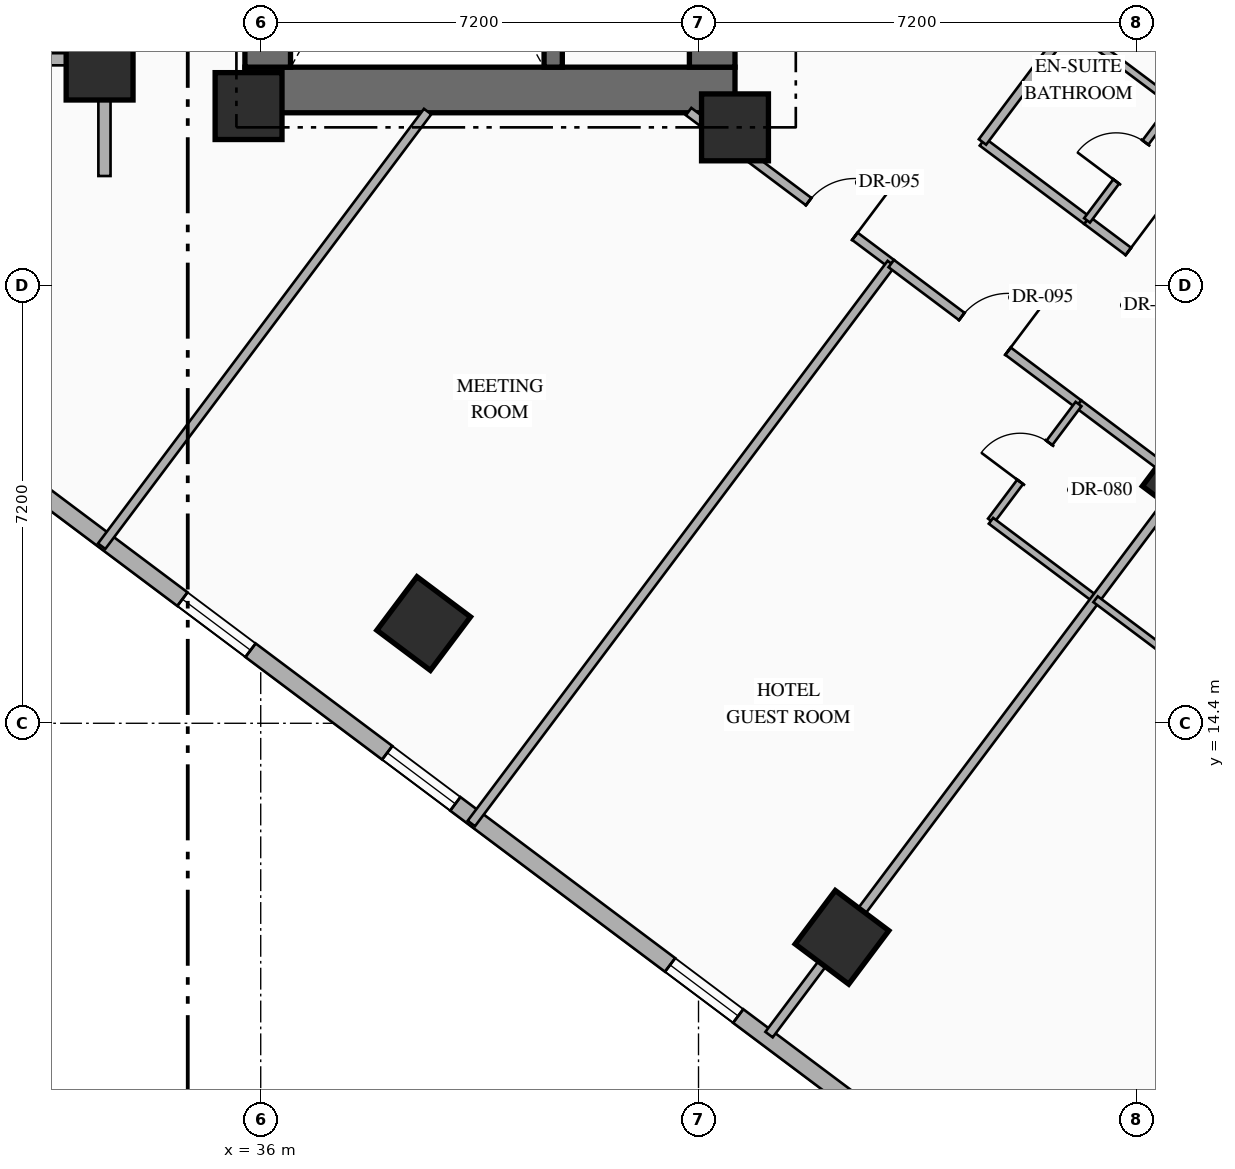
"""IFC4 building model, lengths in metres.
Left out: names, types, materials, properties, quantities, classifications, styles, units other than length and angle.
Written with IfcOpenShell. Run it as: python <this file> out.ifc"""

import sys

from ifc_helpers import new_model, si_unit, direction, frame, frame_2d, origin, origin_2d, place, context, subcontext, project, spatial, rectangle, hollow_rectangle, extrude, element, fill, save


model = new_model("IFC4")
c1 = context("Model", 3, precision=1e-05, world=origin(), true_north=direction((0.0, 1.0)))
c2 = subcontext(c1, "Body", "Model", "MODEL_VIEW")
j1 = project(units=[si_unit("LENGTHUNIT", "METRE"), si_unit("PLANEANGLEUNIT", "RADIAN")], contexts=[c1])
p1 = place(None, origin())
s1 = spatial("IfcSite", under=j1, at=p1, CompositionType="ELEMENT")
p2 = place(p1, origin())
s2 = spatial("IfcBuilding", under=s1, at=p2, CompositionType="ELEMENT")
p3 = place(p2, frame((0.0, 0.0, 56.7)))
s3 = spatial("IfcBuildingStorey", under=s2, at=p3, CompositionType="ELEMENT", Elevation=56.7)
p4 = place(p3, frame((35.74, 24.815, 0.0), z_axis=(0.0, 0.0, 1.0), x_axis=(1.0, 0.0, 0.0)))
e1 = element("IfcWall", 1, at=p4, inside=s3, PredefinedType="SHEAR", context=c2, shape_type="SweptSolid", body=[
    extrude(rectangle(XDim=8.06, YDim=0.75, at=frame_2d((4.03, 0.0))), origin(), (0.0, 0.0, 1.0), 3.35),
])
p5 = place(p3, frame((36.115, 25.19, 0.0), z_axis=(0.0, 0.0, 1.0), x_axis=(0.0, 1.0, 0.0)))
e2 = element("IfcWall", 2, at=p5, inside=s3, PredefinedType="SHEAR", context=c2, shape_type="SweptSolid", body=[
    extrude(rectangle(XDim=9.48, YDim=0.75, at=frame_2d((4.74, 0.0))), origin(), (0.0, 0.0, 1.0), 3.35),
])
p6 = place(p3, frame((43.425, 25.19, 0.0), z_axis=(0.0, 0.0, 1.0), x_axis=(0.0, 1.0, 0.0)))
e3 = element("IfcWall", 3, at=p6, inside=s3, PredefinedType="SHEAR", context=c2, shape_type="SweptSolid", body=[
    extrude(rectangle(XDim=9.48, YDim=0.75, at=frame_2d((4.74, 0.0))), origin(), (0.0, 0.0, 1.0), 3.35),
])
p7 = place(p6, frame((1.21, 0.0, 0.0)))
e4 = element("IfcOpeningElement", 4, at=p7, cuts=e3, PredefinedType="OPENING", context=c2, shape_type="SweptSolid", body=[
    extrude(rectangle(XDim=0.85, YDim=2.08, at=frame_2d((0.425, 1.04))), frame((0.0, 0.385, 0.0), z_axis=(0.0, -1.0, 0.0), x_axis=(1.0, 0.0, 0.0)), (0.0, 0.0, 1.0), 0.77),
])
p8 = place(p6, frame((4.46, 0.0, 0.0)))
e5 = element("IfcOpeningElement", 5, at=p8, cuts=e3, PredefinedType="OPENING", context=c2, shape_type="SweptSolid", body=[
    extrude(rectangle(XDim=0.85, YDim=2.08, at=frame_2d((0.425, 1.04))), frame((0.0, 0.385, 0.0), z_axis=(0.0, -1.0, 0.0), x_axis=(1.0, 0.0, 0.0)), (0.0, 0.0, 1.0), 0.77),
])
p9 = place(p3, frame((40.81, 25.19, 0.0), z_axis=(0.0, 0.0, 1.0), x_axis=(0.0, 1.0, 0.0)))
e6 = element("IfcWall", 6, at=p9, inside=s3, PredefinedType="SHEAR", context=c2, shape_type="SweptSolid", body=[
    extrude(rectangle(XDim=9.48, YDim=0.3, at=frame_2d((4.74, 0.0))), origin(), (0.0, 0.0, 1.0), 3.35),
])
for number, where, z_axis, x_axis in (
    (7, (35.8, 24.55, 0.0), (0.0, 0.0, 1.0), (1.0, 0.0, 0.0)),
    (8, (43.8, 24.2, 0.0), (0.0, 0.0, 1.0), (1.0, 0.0, 0.0)),
):
    element("IfcColumn", number, at=place(p3, frame(where, z_axis=z_axis, x_axis=x_axis)), inside=s3, PredefinedType="COLUMN", context=c2, shape_type="SweptSolid", body=[
        extrude(rectangle(XDim=1.1, YDim=1.1, at=origin_2d()), origin(), (0.0, 0.0, 1.0), 3.35),
    ])
for number, where, z_axis, x_axis in (
    (9, (33.35, 25.2, 0.0), (0.0, 0.0, 1.0), (1.0, 0.0, 0.0)),
    (10, (38.68, 16.04, 0.0), (0.0, 0.0, 1.0), (0.8, -0.6, 0.0)),
    (11, (45.56, 10.88, 0.0), (0.0, 0.0, 1.0), (0.8, -0.6, 0.0)),
):
    element("IfcColumn", number, at=place(p3, frame(where, z_axis=z_axis, x_axis=x_axis)), inside=s3, PredefinedType="COLUMN", context=c2, shape_type="SweptSolid", body=[
        extrude(hollow_rectangle(XDim=1.1, YDim=1.1, WallThickness=0.04, at=origin_2d()), origin(), (0.0, 0.0, 1.0), 3.35),
    ])
p10 = place(p3, frame((51.2, 18.4, 0.0), z_axis=(0.0, 0.0, 1.0), x_axis=(0.799999996291, -0.600000004945, 0.0)))
e12 = element("IfcColumn", 12, at=p10, inside=s3, PredefinedType="COLUMN", context=c2, shape_type="SweptSolid", body=[
    extrude(hollow_rectangle(XDim=1.0, YDim=1.0, WallThickness=0.038, at=origin_2d()), origin(), (0.0, 0.0, 1.0), 3.35),
])
p11 = place(p3, frame((44.86, 40.73, 0.0), z_axis=(0.0, 0.0, 1.0), x_axis=(0.800006902154, -0.599990797017, 0.0)))
e13 = element("IfcWall", 13, at=p11, inside=s3, PredefinedType="STANDARD", context=c2, shape_type="SweptSolid", body=[
    extrude(rectangle(XDim=29.712, YDim=0.28, at=frame_2d((14.856, 0.0))), origin(), (0.0, 0.0, 1.0), 3.13),
])
p12 = place(p11, frame((14.249, 0.0, 0.0)))
e14 = element("IfcOpeningElement", 14, at=p12, cuts=e13, PredefinedType="OPENING", context=c2, shape_type="SweptSolid", body=[
    extrude(rectangle(XDim=1.1, YDim=2.2, at=frame_2d((0.55, 1.1))), frame((0.0, 0.15, 0.0), z_axis=(0.0, -1.0, 0.0), x_axis=(1.0, 0.0, 0.0)), (0.0, 0.0, 1.0), 0.3),
])
p13 = place(p11, frame((1.612, 0.0, 0.85)))
e15 = element("IfcOpeningElement", 15, at=p13, cuts=e13, PredefinedType="OPENING", context=c2, shape_type="SweptSolid", body=[
    extrude(rectangle(XDim=1.4, YDim=1.8, at=frame_2d((0.7, 0.9))), frame((0.0, 0.15, 0.0), z_axis=(0.0, -1.0, 0.0), x_axis=(1.0, 0.0, 0.0)), (0.0, 0.0, 1.0), 0.3),
])
p14 = place(p11, frame((5.667, 0.0, 0.85)))
e16 = element("IfcOpeningElement", 16, at=p14, cuts=e13, PredefinedType="OPENING", context=c2, shape_type="SweptSolid", body=[
    extrude(rectangle(XDim=1.4, YDim=1.8, at=frame_2d((0.7, 0.9))), frame((0.0, 0.15, 0.0), z_axis=(0.0, -1.0, 0.0), x_axis=(1.0, 0.0, 0.0)), (0.0, 0.0, 1.0), 0.3),
])
p15 = place(p11, frame((9.912, 0.0, 0.85)))
e17 = element("IfcOpeningElement", 17, at=p15, cuts=e13, PredefinedType="OPENING", context=c2, shape_type="SweptSolid", body=[
    extrude(rectangle(XDim=1.4, YDim=1.8, at=frame_2d((0.7, 0.9))), frame((0.0, 0.15, 0.0), z_axis=(0.0, -1.0, 0.0), x_axis=(1.0, 0.0, 0.0)), (0.0, 0.0, 1.0), 0.3),
])
p16 = place(p11, frame((19.528, 0.0, 0.85)))
e18 = element("IfcOpeningElement", 18, at=p16, cuts=e13, PredefinedType="OPENING", context=c2, shape_type="SweptSolid", body=[
    extrude(rectangle(XDim=1.4, YDim=1.8, at=frame_2d((0.7, 0.9))), frame((0.0, 0.15, 0.0), z_axis=(0.0, -1.0, 0.0), x_axis=(1.0, 0.0, 0.0)), (0.0, 0.0, 1.0), 0.3),
])
p17 = place(p11, frame((23.451, 0.0, 0.85)))
e19 = element("IfcOpeningElement", 19, at=p17, cuts=e13, PredefinedType="OPENING", context=c2, shape_type="SweptSolid", body=[
    extrude(rectangle(XDim=1.4, YDim=1.8, at=frame_2d((0.7, 0.9))), frame((0.0, 0.15, 0.0), z_axis=(0.0, -1.0, 0.0), x_axis=(1.0, 0.0, 0.0)), (0.0, 0.0, 1.0), 0.3),
])
p18 = place(p11, frame((27.852, 0.0, 0.85)))
e20 = element("IfcOpeningElement", 20, at=p18, cuts=e13, PredefinedType="OPENING", context=c2, shape_type="SweptSolid", body=[
    extrude(rectangle(XDim=1.4, YDim=1.8, at=frame_2d((0.7, 0.9))), frame((0.0, 0.15, 0.0), z_axis=(0.0, -1.0, 0.0), x_axis=(1.0, 0.0, 0.0)), (0.0, 0.0, 1.0), 0.3),
])
p19 = place(p3, frame((53.318, 2.487, 0.0), z_axis=(0.0, 0.0, 1.0), x_axis=(-0.800004174678, 0.599994433723, 0.0)))
e21 = element("IfcWall", 21, at=p19, inside=s3, PredefinedType="STANDARD", context=c2, shape_type="SweptSolid", body=[
    extrude(rectangle(XDim=35.089, YDim=0.28, at=frame_2d((17.544, 0.0))), origin(), (0.0, 0.0, 1.0), 3.13),
])
p20 = place(p19, frame((1.931, 0.0, 0.85)))
e22 = element("IfcOpeningElement", 22, at=p20, cuts=e21, PredefinedType="OPENING", context=c2, shape_type="SweptSolid", body=[
    extrude(rectangle(XDim=1.4, YDim=1.8, at=frame_2d((0.7, 0.9))), frame((0.0, 0.15, 0.0), z_axis=(0.0, -1.0, 0.0), x_axis=(1.0, 0.0, 0.0)), (0.0, 0.0, 1.0), 0.3),
])
p21 = place(p19, frame((6.819, 0.0, 0.85)))
e23 = element("IfcOpeningElement", 23, at=p21, cuts=e21, PredefinedType="OPENING", context=c2, shape_type="SweptSolid", body=[
    extrude(rectangle(XDim=1.4, YDim=1.8, at=frame_2d((0.7, 0.9))), frame((0.0, 0.15, 0.0), z_axis=(0.0, -1.0, 0.0), x_axis=(1.0, 0.0, 0.0)), (0.0, 0.0, 1.0), 0.3),
])
p22 = place(p19, frame((11.832, 0.0, 0.85)))
e24 = element("IfcOpeningElement", 24, at=p22, cuts=e21, PredefinedType="OPENING", context=c2, shape_type="SweptSolid", body=[
    extrude(rectangle(XDim=1.4, YDim=1.8, at=frame_2d((0.7, 0.9))), frame((0.0, 0.15, 0.0), z_axis=(0.0, -1.0, 0.0), x_axis=(1.0, 0.0, 0.0)), (0.0, 0.0, 1.0), 0.3),
])
p23 = place(p19, frame((17.647, 0.0, 0.85)))
e25 = element("IfcOpeningElement", 25, at=p23, cuts=e21, PredefinedType="OPENING", context=c2, shape_type="SweptSolid", body=[
    extrude(rectangle(XDim=1.4, YDim=1.8, at=frame_2d((0.7, 0.9))), frame((0.0, 0.15, 0.0), z_axis=(0.0, -1.0, 0.0), x_axis=(1.0, 0.0, 0.0)), (0.0, 0.0, 1.0), 0.3),
])
p24 = place(p19, frame((21.857, 0.0, 0.85)))
e26 = element("IfcOpeningElement", 26, at=p24, cuts=e21, PredefinedType="OPENING", context=c2, shape_type="SweptSolid", body=[
    extrude(rectangle(XDim=1.4, YDim=1.8, at=frame_2d((0.7, 0.9))), frame((0.0, 0.15, 0.0), z_axis=(0.0, -1.0, 0.0), x_axis=(1.0, 0.0, 0.0)), (0.0, 0.0, 1.0), 0.3),
])
p25 = place(p19, frame((26.87, 0.0, 0.85)))
e27 = element("IfcOpeningElement", 27, at=p25, cuts=e21, PredefinedType="OPENING", context=c2, shape_type="SweptSolid", body=[
    extrude(rectangle(XDim=1.4, YDim=1.8, at=frame_2d((0.7, 0.9))), frame((0.0, 0.15, 0.0), z_axis=(0.0, -1.0, 0.0), x_axis=(1.0, 0.0, 0.0)), (0.0, 0.0, 1.0), 0.3),
])
p26 = place(p19, frame((31.757, 0.0, 0.85)))
e28 = element("IfcOpeningElement", 28, at=p26, cuts=e21, PredefinedType="OPENING", context=c2, shape_type="SweptSolid", body=[
    extrude(rectangle(XDim=1.4, YDim=1.8, at=frame_2d((0.7, 0.9))), frame((0.0, 0.15, 0.0), z_axis=(0.0, -1.0, 0.0), x_axis=(1.0, 0.0, 0.0)), (0.0, 0.0, 1.0), 0.3),
])
p27 = place(p3, frame((33.43, 23.4, 0.0), z_axis=(0.0, 0.0, 1.0), x_axis=(0.0, 1.0, 0.0)))
e29 = element("IfcWall", 29, at=p27, inside=s3, PredefinedType="STANDARD", context=c2, shape_type="SweptSolid", body=[
    extrude(rectangle(XDim=4.08, YDim=0.2, at=frame_2d((2.04, 0.0))), origin(), (0.0, 0.0, 1.0), 2.425),
])
p28 = place(p3, frame((25.55, 25.32, 0.0), z_axis=(0.0, 0.0, 1.0), x_axis=(1.0, 0.0, 0.0)))
e30 = element("IfcWall", 30, at=p28, inside=s3, PredefinedType="STANDARD", context=c2, shape_type="SweptSolid", body=[
    extrude(rectangle(XDim=7.88, YDim=0.2, at=frame_2d((3.94, 0.0))), origin(), (0.0, 0.0, 1.0), 2.525),
])
p29 = place(p3, frame((43.037, 24.46, 0.0), z_axis=(0.0, 0.0, 1.0), x_axis=(0.799971872363, -0.600037501685, 0.0)))
e31 = element("IfcWall", 31, at=p29, inside=s3, PredefinedType="PARTITIONING", context=c2, shape_type="SweptSolid", body=[
    extrude(rectangle(XDim=4.167, YDim=0.15, at=frame_2d((2.083, 0.0))), origin(), (0.0, 0.0, 1.0), 2.425),
])
p30 = place(p29, frame((2.468, 0.0, 0.0)))
e32 = element("IfcOpeningElement", 32, at=p30, cuts=e31, PredefinedType="OPENING", context=c2, shape_type="SweptSolid", body=[
    extrude(rectangle(XDim=0.95, YDim=2.15, at=frame_2d((0.475, 1.075))), frame((0.0, 0.085, 0.0), z_axis=(0.0, -1.0, 0.0), x_axis=(1.0, 0.0, 0.0)), (0.0, 0.0, 1.0), 0.17),
])
p31 = place(p3, frame((33.384, 17.312, 0.0), z_axis=(0.0, 0.0, 1.0), x_axis=(0.600008743659, 0.799993442181, 0.0)))
e33 = element("IfcWall", 33, at=p31, inside=s3, PredefinedType="PARTITIONING", context=c2, shape_type="SweptSolid", body=[
    extrude(rectangle(XDim=8.935, YDim=0.15, at=frame_2d((4.468, 0.0))), origin(), (0.0, 0.0, 1.0), 3.13),
])
p32 = place(p3, frame((39.464, 12.752, 0.0), z_axis=(0.0, 0.0, 1.0), x_axis=(0.6, 0.8, 0.0)))
e34 = element("IfcWall", 34, at=p32, inside=s3, PredefinedType="PARTITIONING", context=c2, shape_type="SweptSolid", body=[
    extrude(rectangle(XDim=11.51, YDim=0.15, at=frame_2d((5.755, 0.0))), origin(), (0.0, 0.0, 1.0), 3.13),
])
p33 = place(p3, frame((47.87, 23.96, 0.0), z_axis=(0.0, 0.0, 1.0), x_axis=(0.79998637334, -0.60001816845, 0.0)))
e35 = element("IfcWall", 35, at=p33, inside=s3, PredefinedType="PARTITIONING", context=c2, shape_type="SweptSolid", body=[
    extrude(rectangle(XDim=2.15, YDim=0.15, at=frame_2d((1.075, 0.0))), origin(), (0.0, 0.0, 1.0), 2.775),
])
p34 = place(p3, frame((49.59, 22.67, 0.0), z_axis=(0.0, 0.0, 1.0), x_axis=(0.800011056104, -0.599985258246, 0.0)))
e36 = element("IfcWall", 36, at=p34, inside=s3, PredefinedType="PARTITIONING", context=c2, shape_type="SweptSolid", body=[
    extrude(rectangle(XDim=2.65, YDim=0.15, at=frame_2d((1.325, 0.0))), origin(), (0.0, 0.0, 1.0), 2.775),
])
p35 = place(p34, frame((0.85, 0.0, 0.0)))
e37 = element("IfcOpeningElement", 37, at=p35, cuts=e36, PredefinedType="OPENING", context=c2, shape_type="SweptSolid", body=[
    extrude(rectangle(XDim=0.95, YDim=2.15, at=frame_2d((0.475, 1.075))), frame((0.0, 0.085, 0.0), z_axis=(0.0, -1.0, 0.0), x_axis=(1.0, 0.0, 0.0)), (0.0, 0.0, 1.0), 0.17),
])
p36 = place(p3, frame((49.59, 22.67, 0.0), z_axis=(0.0, 0.0, 1.0), x_axis=(0.599951172744, 0.800036618114, 0.0)))
e38 = element("IfcWall", 38, at=p36, inside=s3, PredefinedType="PARTITIONING", context=c2, shape_type="SweptSolid", body=[
    extrude(rectangle(XDim=2.4, YDim=0.12, at=frame_2d((1.2, 0.0))), origin(), (0.0, 0.0, 1.0), 3.13),
])
p37 = place(p36, frame((0.8, 0.0, 0.0)))
e39 = element("IfcOpeningElement", 39, at=p37, cuts=e38, PredefinedType="OPENING", context=c2, shape_type="SweptSolid", body=[
    extrude(rectangle(XDim=0.8, YDim=2.06, at=frame_2d((0.4, 1.03))), frame((0.0, 0.07, 0.0), z_axis=(0.0, -1.0, 0.0), x_axis=(1.0, 0.0, 0.0)), (0.0, 0.0, 1.0), 0.14),
])
p38 = place(p3, frame((49.31, 25.88, 0.0), z_axis=(0.0, 0.0, 1.0), x_axis=(0.800040880289, -0.59994548908, 0.0)))
e40 = element("IfcWall", 40, at=p38, inside=s3, PredefinedType="PARTITIONING", context=c2, shape_type="SweptSolid", body=[
    extrude(rectangle(XDim=2.15, YDim=0.12, at=frame_2d((1.075, 0.0))), origin(), (0.0, 0.0, 1.0), 3.13),
])
p39 = place(p3, frame((47.87, 23.96, 0.0), z_axis=(0.0, 0.0, 1.0), x_axis=(0.599996617946, 0.80000253653, 0.0)))
e41 = element("IfcWall", 41, at=p39, inside=s3, PredefinedType="PARTITIONING", context=c2, shape_type="SweptSolid", body=[
    extrude(rectangle(XDim=11.55, YDim=0.15, at=frame_2d((5.775, 0.0))), origin(), (0.0, 0.0, 1.0), 3.13),
])
p40 = place(p3, frame((46.37, 21.96, 0.0), z_axis=(0.0, 0.0, 1.0), x_axis=(0.799977170108, -0.600030438649, 0.0)))
e42 = element("IfcWall", 42, at=p40, inside=s3, PredefinedType="PARTITIONING", context=c2, shape_type="SweptSolid", body=[
    extrude(rectangle(XDim=3.85, YDim=0.15, at=frame_2d((1.925, 0.0))), origin(), (0.0, 0.0, 1.0), 2.425),
])
p41 = place(p40, frame((1.45, 0.0, 0.0)))
e43 = element("IfcOpeningElement", 43, at=p41, cuts=e42, PredefinedType="OPENING", context=c2, shape_type="SweptSolid", body=[
    extrude(rectangle(XDim=0.95, YDim=2.15, at=frame_2d((0.475, 1.075))), frame((0.0, 0.085, 0.0), z_axis=(0.0, -1.0, 0.0), x_axis=(1.0, 0.0, 0.0)), (0.0, 0.0, 1.0), 0.17),
])
p42 = place(p3, frame((49.45, 19.65, 0.0), z_axis=(0.0, 0.0, 1.0), x_axis=(0.800040880289, -0.59994548908, 0.0)))
e44 = element("IfcWall", 44, at=p42, inside=s3, PredefinedType="PARTITIONING", context=c2, shape_type="SweptSolid", body=[
    extrude(rectangle(XDim=2.15, YDim=0.15, at=frame_2d((1.075, 0.0))), origin(), (0.0, 0.0, 1.0), 2.425),
])
p43 = place(p3, frame((48.01, 17.73, 0.0), z_axis=(0.0, 0.0, 1.0), x_axis=(0.6, 0.8, 0.0)))
e45 = element("IfcWall", 45, at=p43, inside=s3, PredefinedType="PARTITIONING", context=c2, shape_type="SweptSolid", body=[
    extrude(rectangle(XDim=2.4, YDim=0.12, at=frame_2d((1.2, 0.0))), origin(), (0.0, 0.0, 1.0), 3.13),
])
p44 = place(p43, frame((0.8, 0.0, 0.0)))
e46 = element("IfcOpeningElement", 46, at=p44, cuts=e45, PredefinedType="OPENING", context=c2, shape_type="SweptSolid", body=[
    extrude(rectangle(XDim=0.8, YDim=2.06, at=frame_2d((0.4, 1.03))), frame((0.0, 0.07, 0.0), z_axis=(0.0, -1.0, 0.0), x_axis=(1.0, 0.0, 0.0)), (0.0, 0.0, 1.0), 0.14),
])
p45 = place(p3, frame((48.01, 17.73, 0.0), z_axis=(0.0, 0.0, 1.0), x_axis=(0.79998637334, -0.60001816845, 0.0)))
e47 = element("IfcWall", 47, at=p45, inside=s3, PredefinedType="PARTITIONING", context=c2, shape_type="SweptSolid", body=[
    extrude(rectangle(XDim=2.15, YDim=0.12, at=frame_2d((1.075, 0.0))), origin(), (0.0, 0.0, 1.0), 3.13),
])
p46 = place(p3, frame((44.36, 9.28, 0.0), z_axis=(0.0, 0.0, 1.0), x_axis=(0.599986233332, 0.800010324816, 0.0)))
e48 = element("IfcWall", 48, at=p46, inside=s3, PredefinedType="PARTITIONING", context=c2, shape_type="SweptSolid", body=[
    extrude(rectangle(XDim=11.35, YDim=0.15, at=frame_2d((5.675, 0.0))), origin(), (0.0, 0.0, 1.0), 2.425),
])
p47 = place(p3, frame((49.73, 16.44, 0.0), z_axis=(0.0, 0.0, 1.0), x_axis=(0.79998637334, -0.60001816845, 0.0)))
e49 = element("IfcWall", 49, at=p47, inside=s3, PredefinedType="PARTITIONING", context=c2, shape_type="SweptSolid", body=[
    extrude(rectangle(XDim=2.15, YDim=0.12, at=frame_2d((1.075, 0.0))), origin(), (0.0, 0.0, 1.0), 3.13),
])
p48 = place(p22, origin())
e50 = element("IfcWindow", 50, at=p48, inside=s3, PartitioningType="SINGLE_PANEL", PredefinedType="WINDOW", context=c2, shape_type="SweptSolid", body=[
    extrude(rectangle(XDim=1.4, YDim=1.8, at=frame_2d((0.7, 0.9))), frame((0.0, 0.03, 0.0), z_axis=(0.0, -1.0, 0.0), x_axis=(1.0, 0.0, 0.0)), (0.0, 0.0, 1.0), 0.06),
])
fill(e24, e50)
p49 = place(p23, origin())
e51 = element("IfcWindow", 51, at=p49, inside=s3, PartitioningType="SINGLE_PANEL", PredefinedType="WINDOW", context=c2, shape_type="SweptSolid", body=[
    extrude(rectangle(XDim=1.4, YDim=1.8, at=frame_2d((0.7, 0.9))), frame((0.0, 0.03, 0.0), z_axis=(0.0, -1.0, 0.0), x_axis=(1.0, 0.0, 0.0)), (0.0, 0.0, 1.0), 0.06),
])
fill(e25, e51)
p50 = place(p24, origin())
e52 = element("IfcWindow", 52, at=p50, inside=s3, PartitioningType="SINGLE_PANEL", PredefinedType="WINDOW", context=c2, shape_type="SweptSolid", body=[
    extrude(rectangle(XDim=1.4, YDim=1.8, at=frame_2d((0.7, 0.9))), frame((0.0, 0.03, 0.0), z_axis=(0.0, -1.0, 0.0), x_axis=(1.0, 0.0, 0.0)), (0.0, 0.0, 1.0), 0.06),
])
fill(e26, e52)
p51 = place(p30, origin())
e53 = element("IfcDoor", 53, at=p51, inside=s3, OperationType="SINGLE_SWING_RIGHT", PredefinedType="DOOR", context=c2, shape_type="SweptSolid", body=[
    extrude(rectangle(XDim=0.95, YDim=2.15, at=frame_2d((0.475, 1.075))), frame((0.0, 0.025, 0.0), z_axis=(0.0, -1.0, 0.0), x_axis=(1.0, 0.0, 0.0)), (0.0, 0.0, 1.0), 0.05),
])
fill(e32, e53)
p52 = place(p35, origin())
e54 = element("IfcDoor", 54, at=p52, inside=s3, OperationType="SINGLE_SWING_LEFT", PredefinedType="DOOR", context=c2, shape_type="SweptSolid", body=[
    extrude(rectangle(XDim=0.95, YDim=2.15, at=frame_2d((0.475, 1.075))), frame((0.0, 0.025, 0.0), z_axis=(0.0, -1.0, 0.0), x_axis=(1.0, 0.0, 0.0)), (0.0, 0.0, 1.0), 0.05),
])
fill(e37, e54)
p53 = place(p37, origin())
e55 = element("IfcDoor", 55, at=p53, inside=s3, OperationType="SINGLE_SWING_LEFT", PredefinedType="DOOR", context=c2, shape_type="SweptSolid", body=[
    extrude(rectangle(XDim=0.8, YDim=2.06, at=frame_2d((0.4, 1.03))), frame((0.0, 0.025, 0.0), z_axis=(0.0, -1.0, 0.0), x_axis=(1.0, 0.0, 0.0)), (0.0, 0.0, 1.0), 0.05),
])
fill(e39, e55)
p54 = place(p41, origin())
e56 = element("IfcDoor", 56, at=p54, inside=s3, OperationType="SINGLE_SWING_RIGHT", PredefinedType="DOOR", context=c2, shape_type="SweptSolid", body=[
    extrude(rectangle(XDim=0.95, YDim=2.15, at=frame_2d((0.475, 1.075))), frame((0.0, 0.025, 0.0), z_axis=(0.0, -1.0, 0.0), x_axis=(1.0, 0.0, 0.0)), (0.0, 0.0, 1.0), 0.05),
])
fill(e43, e56)
p55 = place(p44, origin())
e57 = element("IfcDoor", 57, at=p55, inside=s3, OperationType="SINGLE_SWING_LEFT", PredefinedType="DOOR", context=c2, shape_type="SweptSolid", body=[
    extrude(rectangle(XDim=0.8, YDim=2.06, at=frame_2d((0.4, 1.03))), frame((0.0, 0.025, 0.0), z_axis=(0.0, -1.0, 0.0), x_axis=(1.0, 0.0, 0.0)), (0.0, 0.0, 1.0), 0.05),
])
fill(e46, e57)
save(model, sys.argv[1])
